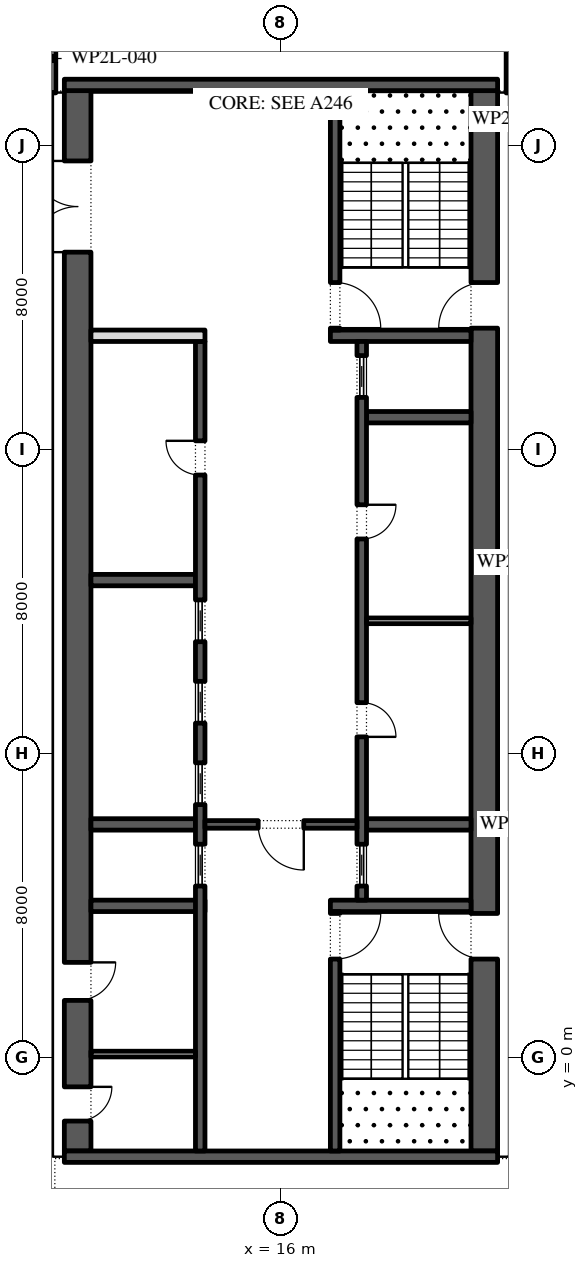
"""IFC4 building model, lengths in metres.
Left out: names, types, materials, properties, quantities, classifications, styles, units other than length and angle.
Written with IfcOpenShell. Run it as: python <this file> out.ifc"""

import sys

from ifc_helpers import new_model, si_unit, direction, frame, frame_2d, origin, place, context, subcontext, project, spatial, rectangle, extrude, element, fill, save


model = new_model("IFC4")
c1 = context("Model", 3, precision=1e-05, world=origin(), true_north=direction((0.0, 1.0)))
c2 = subcontext(c1, "Body", "Model", "MODEL_VIEW")
j1 = project(units=[si_unit("LENGTHUNIT", "METRE"), si_unit("PLANEANGLEUNIT", "RADIAN")], contexts=[c1])
p1 = place(None, origin())
s1 = spatial("IfcSite", under=j1, at=p1, CompositionType="ELEMENT")
p2 = place(p1, origin())
s2 = spatial("IfcBuilding", under=s1, at=p2, CompositionType="ELEMENT")
p3 = place(p2, frame((0.0, 0.0, 196.8)))
s3 = spatial("IfcBuildingStorey", under=s2, at=p3, CompositionType="ELEMENT", Elevation=196.8)
p4 = place(p3, frame((33.157, -5.092, 0.0), z_axis=(0.0, 0.0, 1.0), x_axis=(-0.224950279389, 0.974370243697, 0.0)))
e1 = element("IfcWall", 1, at=p4, inside=s3, PredefinedType="STANDARD", context=c2, shape_type="SweptSolid", body=[
    extrude(rectangle(XDim=49.5, YDim=0.3, at=frame_2d((24.75, 0.0))), origin(), (0.0, 0.0, 1.0), 4.0),
])
p5 = place(p4, frame((2.207, 0.0, 0.0)))
e2 = element("IfcOpeningElement", 2, at=p5, cuts=e1, PredefinedType="OPENING", context=c2, shape_type="SweptSolid", body=[
    extrude(rectangle(XDim=2.4, YDim=3.125, at=frame_2d((1.2, 1.562))), frame((0.0, 0.16, 0.0), z_axis=(0.0, -1.0, 0.0), x_axis=(1.0, 0.0, 0.0)), (0.0, 0.0, 1.0), 0.32),
])
p6 = place(p4, frame((8.121, 0.0, 0.45)))
e3 = element("IfcOpeningElement", 3, at=p6, cuts=e1, PredefinedType="OPENING", context=c2, shape_type="SweptSolid", body=[
    extrude(rectangle(XDim=4.5, YDim=2.875, at=frame_2d((2.25, 1.438))), frame((0.0, 0.16, 0.0), z_axis=(0.0, -1.0, 0.0), x_axis=(1.0, 0.0, 0.0)), (0.0, 0.0, 1.0), 0.32),
])
p7 = place(p4, frame((15.236, 0.0, 0.45)))
e4 = element("IfcOpeningElement", 4, at=p7, cuts=e1, PredefinedType="OPENING", context=c2, shape_type="SweptSolid", body=[
    extrude(rectangle(XDim=4.5, YDim=2.875, at=frame_2d((2.25, 1.438))), frame((0.0, 0.16, 0.0), z_axis=(0.0, -1.0, 0.0), x_axis=(1.0, 0.0, 0.0)), (0.0, 0.0, 1.0), 0.32),
])
p8 = place(p4, frame((22.35, 0.0, 0.45)))
e5 = element("IfcOpeningElement", 5, at=p8, cuts=e1, PredefinedType="OPENING", context=c2, shape_type="SweptSolid", body=[
    extrude(rectangle(XDim=4.5, YDim=3.0, at=frame_2d((2.25, 1.5))), frame((0.0, 0.16, 0.0), z_axis=(0.0, -1.0, 0.0), x_axis=(1.0, 0.0, 0.0)), (0.0, 0.0, 1.0), 0.32),
])
p9 = place(p4, frame((30.514, 0.0, 0.0)))
e6 = element("IfcOpeningElement", 6, at=p9, cuts=e1, PredefinedType="OPENING", context=c2, shape_type="SweptSolid", body=[
    extrude(rectangle(XDim=2.4, YDim=3.45, at=frame_2d((1.2, 1.725))), frame((0.0, 0.16, 0.0), z_axis=(0.0, -1.0, 0.0), x_axis=(1.0, 0.0, 0.0)), (0.0, 0.0, 1.0), 0.32),
])
p10 = place(p4, frame((36.579, 0.0, 0.45)))
e7 = element("IfcOpeningElement", 7, at=p10, cuts=e1, PredefinedType="OPENING", context=c2, shape_type="SweptSolid", body=[
    extrude(rectangle(XDim=4.5, YDim=3.05, at=frame_2d((2.25, 1.525))), frame((0.0, 0.16, 0.0), z_axis=(0.0, -1.0, 0.0), x_axis=(1.0, 0.0, 0.0)), (0.0, 0.0, 1.0), 0.32),
])
p11 = place(p4, frame((43.693, 0.0, 0.45)))
e8 = element("IfcOpeningElement", 8, at=p11, cuts=e1, PredefinedType="OPENING", context=c2, shape_type="SweptSolid", body=[
    extrude(rectangle(XDim=4.5, YDim=3.05, at=frame_2d((2.25, 1.525))), frame((0.0, 0.16, 0.0), z_axis=(0.0, -1.0, 0.0), x_axis=(1.0, 0.0, 0.0)), (0.0, 0.0, 1.0), 0.32),
])
p12 = place(p3, frame((21.35, -2.45, 0.0), z_axis=(0.0, 0.0, 1.0), x_axis=(0.0, 1.0, 0.0)))
e9 = element("IfcWall", 9, at=p12, inside=s3, PredefinedType="SHEAR", context=c2, shape_type="SweptSolid", body=[
    extrude(rectangle(XDim=27.9, YDim=0.7, at=frame_2d((13.95, 0.0))), origin(), (0.0, 0.0, 1.0), 4.0),
])
p13 = place(p12, frame((5.05, 0.0, 0.0)))
e10 = element("IfcOpeningElement", 10, at=p13, cuts=e9, PredefinedType="OPENING", context=c2, shape_type="SweptSolid", body=[
    extrude(rectangle(XDim=1.2, YDim=2.1, at=frame_2d((0.6, 1.05))), frame((0.0, 0.36, 0.0), z_axis=(0.0, -1.0, 0.0), x_axis=(1.0, 0.0, 0.0)), (0.0, 0.0, 1.0), 0.72),
])
p14 = place(p12, frame((21.65, 0.0, 0.0)))
e11 = element("IfcOpeningElement", 11, at=p14, cuts=e9, PredefinedType="OPENING", context=c2, shape_type="SweptSolid", body=[
    extrude(rectangle(XDim=1.2, YDim=2.1, at=frame_2d((0.6, 1.05))), frame((0.0, 0.36, 0.0), z_axis=(0.0, -1.0, 0.0), x_axis=(1.0, 0.0, 0.0)), (0.0, 0.0, 1.0), 0.72),
])
p15 = place(p3, frame((10.65, -2.45, 0.0), z_axis=(0.0, 0.0, 1.0), x_axis=(0.0, 1.0, 0.0)))
e12 = element("IfcWall", 12, at=p15, inside=s3, PredefinedType="SHEAR", context=c2, shape_type="SweptSolid", body=[
    extrude(rectangle(XDim=27.9, YDim=0.7, at=frame_2d((13.95, 0.0))), origin(), (0.0, 0.0, 1.0), 4.0),
])
p16 = place(p15, frame((23.65, 0.0, 0.0)))
e13 = element("IfcOpeningElement", 13, at=p16, cuts=e12, PredefinedType="OPENING", context=c2, shape_type="SweptSolid", body=[
    extrude(rectangle(XDim=2.4, YDim=2.1, at=frame_2d((1.2, 1.05))), frame((0.0, 0.36, 0.0), z_axis=(0.0, -1.0, 0.0), x_axis=(1.0, 0.0, 0.0)), (0.0, 0.0, 1.0), 0.72),
])
p17 = place(p15, frame((0.788, 0.0, 0.0)))
e14 = element("IfcOpeningElement", 14, at=p17, cuts=e12, PredefinedType="OPENING", context=c2, shape_type="SweptSolid", body=[
    extrude(rectangle(XDim=0.9, YDim=2.1, at=frame_2d((0.45, 1.05))), frame((0.0, 0.36, 0.0), z_axis=(0.0, -1.0, 0.0), x_axis=(1.0, 0.0, 0.0)), (0.0, 0.0, 1.0), 0.72),
])
p18 = place(p15, frame((3.962, 0.0, 0.0)))
e15 = element("IfcOpeningElement", 15, at=p18, cuts=e12, PredefinedType="OPENING", context=c2, shape_type="SweptSolid", body=[
    extrude(rectangle(XDim=1.0, YDim=2.1, at=frame_2d((0.5, 1.05))), frame((0.0, 0.36, 0.0), z_axis=(0.0, -1.0, 0.0), x_axis=(1.0, 0.0, 0.0)), (0.0, 0.0, 1.0), 0.72),
])
for number, where, z_axis, x_axis in (
    (16, (10.3, -2.6, 0.0), (0.0, 0.0, 1.0), (1.0, 0.0, 0.0)),
    (17, (10.3, 25.6, 0.0), (0.0, 0.0, 1.0), (1.0, 0.0, 0.0)),
):
    element("IfcWall", number, at=place(p3, frame(where, z_axis=z_axis, x_axis=x_axis)), inside=s3, PredefinedType="SHEAR", context=c2, shape_type="SweptSolid", body=[
        extrude(rectangle(XDim=11.4, YDim=0.3, at=frame_2d((5.7, 0.0))), origin(), (0.0, 0.0, 1.0), 4.0),
    ])
p19 = place(p3, frame((17.3, 4.0, 0.0), z_axis=(0.0, 0.0, 1.0), x_axis=(1.0, 0.0, 0.0)))
e18 = element("IfcWall", 18, at=p19, inside=s3, PredefinedType="SHEAR", context=c2, shape_type="SweptSolid", body=[
    extrude(rectangle(XDim=3.7, YDim=0.3, at=frame_2d((1.85, 0.0))), origin(), (0.0, 0.0, 1.0), 4.0),
])
p20 = place(p3, frame((17.425, -2.45, 0.0), z_axis=(0.0, 0.0, 1.0), x_axis=(0.0, 1.0, 0.0)))
e19 = element("IfcWall", 19, at=p20, inside=s3, PredefinedType="SHEAR", context=c2, shape_type="SweptSolid", body=[
    extrude(rectangle(XDim=6.3, YDim=0.25, at=frame_2d((3.15, 0.0))), origin(), (0.0, 0.0, 1.0), 4.0),
])
p21 = place(p20, frame((5.05, 0.0, 0.0)))
e20 = element("IfcOpeningElement", 20, at=p21, cuts=e19, PredefinedType="OPENING", context=c2, shape_type="SweptSolid", body=[
    extrude(rectangle(XDim=1.2, YDim=2.1, at=frame_2d((0.6, 1.05))), frame((0.0, 0.135, 0.0), z_axis=(0.0, -1.0, 0.0), x_axis=(1.0, 0.0, 0.0)), (0.0, 0.0, 1.0), 0.27),
])
p22 = place(p3, frame((17.3, 19.0, 0.0), z_axis=(0.0, 0.0, 1.0), x_axis=(1.0, 0.0, 0.0)))
e21 = element("IfcWall", 21, at=p22, inside=s3, PredefinedType="SHEAR", context=c2, shape_type="SweptSolid", body=[
    extrude(rectangle(XDim=3.7, YDim=0.3, at=frame_2d((1.85, 0.0))), origin(), (0.0, 0.0, 1.0), 4.0),
])
p23 = place(p3, frame((17.425, 19.15, 0.0), z_axis=(0.0, 0.0, 1.0), x_axis=(0.0, 1.0, 0.0)))
e22 = element("IfcWall", 22, at=p23, inside=s3, PredefinedType="SHEAR", context=c2, shape_type="SweptSolid", body=[
    extrude(rectangle(XDim=6.3, YDim=0.25, at=frame_2d((3.15, 0.0))), origin(), (0.0, 0.0, 1.0), 4.0),
])
p24 = place(p23, frame((0.05, 0.0, 0.0)))
e23 = element("IfcOpeningElement", 23, at=p24, cuts=e22, PredefinedType="OPENING", context=c2, shape_type="SweptSolid", body=[
    extrude(rectangle(XDim=1.2, YDim=2.1, at=frame_2d((0.6, 1.05))), frame((0.0, 0.135, 0.0), z_axis=(0.0, -1.0, 0.0), x_axis=(1.0, 0.0, 0.0)), (0.0, 0.0, 1.0), 0.27),
])
for number, where, z_axis, x_axis in (
    (24, (18.25, 6.143, 0.0), (0.0, 0.0, 1.0), (1.0, 0.0, 0.0)),
    (25, (18.25, 16.857, 0.0), (0.0, 0.0, 1.0), (1.0, 0.0, 0.0)),
):
    element("IfcWall", number, at=place(p3, frame(where, z_axis=z_axis, x_axis=x_axis)), inside=s3, PredefinedType="SHEAR", context=c2, shape_type="SweptSolid", body=[
        extrude(rectangle(XDim=2.75, YDim=0.3, at=frame_2d((1.375, 0.0))), origin(), (0.0, 0.0, 1.0), 4.0),
    ])
p25 = place(p3, frame((18.125, 4.15, 0.0), z_axis=(0.0, 0.0, 1.0), x_axis=(0.0, 1.0, 0.0)))
e26 = element("IfcWall", 26, at=p25, inside=s3, PredefinedType="SHEAR", context=c2, shape_type="SweptSolid", body=[
    extrude(rectangle(XDim=14.7, YDim=0.25, at=frame_2d((7.35, 0.0))), origin(), (0.0, 0.0, 1.0), 4.0),
])
p26 = place(p25, frame((4.296, 0.0, 0.0)))
e27 = element("IfcOpeningElement", 27, at=p26, cuts=e26, PredefinedType="OPENING", context=c2, shape_type="SweptSolid", body=[
    extrude(rectangle(XDim=0.9, YDim=2.1, at=frame_2d((0.45, 1.05))), frame((0.0, 0.135, 0.0), z_axis=(0.0, -1.0, 0.0), x_axis=(1.0, 0.0, 0.0)), (0.0, 0.0, 1.0), 0.27),
])
p27 = place(p25, frame((9.504, 0.0, 0.0)))
e28 = element("IfcOpeningElement", 28, at=p27, cuts=e26, PredefinedType="OPENING", context=c2, shape_type="SweptSolid", body=[
    extrude(rectangle(XDim=0.9, YDim=2.1, at=frame_2d((0.45, 1.05))), frame((0.0, 0.135, 0.0), z_axis=(0.0, -1.0, 0.0), x_axis=(1.0, 0.0, 0.0)), (0.0, 0.0, 1.0), 0.27),
])
p28 = place(p25, frame((0.371, 0.0, 0.0)))
e29 = element("IfcOpeningElement", 29, at=p28, cuts=e26, PredefinedType="OPENING", context=c2, shape_type="SweptSolid", body=[
    extrude(rectangle(XDim=1.1, YDim=2.1, at=frame_2d((0.55, 1.05))), frame((0.0, 0.135, 0.0), z_axis=(0.0, -1.0, 0.0), x_axis=(1.0, 0.0, 0.0)), (0.0, 0.0, 1.0), 0.27),
])
p29 = place(p25, frame((13.229, 0.0, 0.0)))
e30 = element("IfcOpeningElement", 30, at=p29, cuts=e26, PredefinedType="OPENING", context=c2, shape_type="SweptSolid", body=[
    extrude(rectangle(XDim=1.1, YDim=2.1, at=frame_2d((0.55, 1.05))), frame((0.0, 0.135, 0.0), z_axis=(0.0, -1.0, 0.0), x_axis=(1.0, 0.0, 0.0)), (0.0, 0.0, 1.0), 0.27),
])
p30 = place(p3, frame((18.25, 11.5, 0.0), z_axis=(0.0, 0.0, 1.0), x_axis=(1.0, 0.0, 0.0)))
e31 = element("IfcWall", 31, at=p30, inside=s3, PredefinedType="PARTITIONING", context=c2, shape_type="SweptSolid", body=[
    extrude(rectangle(XDim=2.75, YDim=0.15, at=frame_2d((1.375, 0.0))), origin(), (0.0, 0.0, 1.0), 4.0),
])
p31 = place(p3, frame((11.0, 4.0, 0.0), z_axis=(0.0, 0.0, 1.0), x_axis=(1.0, 0.0, 0.0)))
e32 = element("IfcWall", 32, at=p31, inside=s3, PredefinedType="SHEAR", context=c2, shape_type="SweptSolid", body=[
    extrude(rectangle(XDim=3.0, YDim=0.3, at=frame_2d((1.5, 0.0))), origin(), (0.0, 0.0, 1.0), 4.0),
])
for number, where, z_axis, x_axis in (
    (33, (11.0, 6.143, 0.0), (0.0, 0.0, 1.0), (1.0, 0.0, 0.0)),
    (34, (11.0, 12.571, 0.0), (0.0, 0.0, 1.0), (1.0, 0.0, 0.0)),
):
    element("IfcWall", number, at=place(p3, frame(where, z_axis=z_axis, x_axis=x_axis)), inside=s3, PredefinedType="SHEAR", context=c2, shape_type="SweptSolid", body=[
        extrude(rectangle(XDim=2.75, YDim=0.3, at=frame_2d((1.375, 0.0))), origin(), (0.0, 0.0, 1.0), 4.0),
    ])
p32 = place(p3, frame((13.875, -2.45, 0.0), z_axis=(0.0, 0.0, 1.0), x_axis=(0.0, 1.0, 0.0)))
e35 = element("IfcWall", 35, at=p32, inside=s3, PredefinedType="SHEAR", context=c2, shape_type="SweptSolid", body=[
    extrude(rectangle(XDim=21.3, YDim=0.25, at=frame_2d((10.65, 0.0))), origin(), (0.0, 0.0, 1.0), 4.0),
])
p33 = place(p32, frame((17.786, 0.0, 0.0)))
e36 = element("IfcOpeningElement", 36, at=p33, cuts=e35, PredefinedType="OPENING", context=c2, shape_type="SweptSolid", body=[
    extrude(rectangle(XDim=0.9, YDim=2.1, at=frame_2d((0.45, 1.05))), frame((0.0, 0.135, 0.0), z_axis=(0.0, -1.0, 0.0), x_axis=(1.0, 0.0, 0.0)), (0.0, 0.0, 1.0), 0.27),
])
p34 = place(p32, frame((6.971, 0.0, 0.0)))
e37 = element("IfcOpeningElement", 37, at=p34, cuts=e35, PredefinedType="OPENING", context=c2, shape_type="SweptSolid", body=[
    extrude(rectangle(XDim=1.1, YDim=2.1, at=frame_2d((0.55, 1.05))), frame((0.0, 0.135, 0.0), z_axis=(0.0, -1.0, 0.0), x_axis=(1.0, 0.0, 0.0)), (0.0, 0.0, 1.0), 0.27),
])
p35 = place(p32, frame((9.114, 0.0, 0.0)))
e38 = element("IfcOpeningElement", 38, at=p35, cuts=e35, PredefinedType="OPENING", context=c2, shape_type="SweptSolid", body=[
    extrude(rectangle(XDim=1.1, YDim=2.1, at=frame_2d((0.55, 1.05))), frame((0.0, 0.135, 0.0), z_axis=(0.0, -1.0, 0.0), x_axis=(1.0, 0.0, 0.0)), (0.0, 0.0, 1.0), 0.27),
])
p36 = place(p32, frame((11.257, 0.0, 0.0)))
e39 = element("IfcOpeningElement", 39, at=p36, cuts=e35, PredefinedType="OPENING", context=c2, shape_type="SweptSolid", body=[
    extrude(rectangle(XDim=1.1, YDim=2.1, at=frame_2d((0.55, 1.05))), frame((0.0, 0.135, 0.0), z_axis=(0.0, -1.0, 0.0), x_axis=(1.0, 0.0, 0.0)), (0.0, 0.0, 1.0), 0.27),
])
p37 = place(p32, frame((13.4, 0.0, 0.0)))
e40 = element("IfcOpeningElement", 40, at=p37, cuts=e35, PredefinedType="OPENING", context=c2, shape_type="SweptSolid", body=[
    extrude(rectangle(XDim=1.1, YDim=2.1, at=frame_2d((0.55, 1.05))), frame((0.0, 0.135, 0.0), z_axis=(0.0, -1.0, 0.0), x_axis=(1.0, 0.0, 0.0)), (0.0, 0.0, 1.0), 0.27),
])
p38 = place(p3, frame((11.0, 19.0, 0.0), z_axis=(0.0, 0.0, 1.0), x_axis=(1.0, 0.0, 0.0)))
e41 = element("IfcWall", 41, at=p38, inside=s3, PredefinedType="PARTITIONING", context=c2, shape_type="SweptSolid", body=[
    extrude(rectangle(XDim=3.0, YDim=0.3, at=frame_2d((1.5, 0.0))), origin(), (0.0, 0.0, 1.0), 4.0),
])
p39 = place(p3, frame((14.0, 6.143, 0.0), z_axis=(0.0, 0.0, 1.0), x_axis=(1.0, 0.0, 0.0)))
e42 = element("IfcWall", 42, at=p39, inside=s3, PredefinedType="SHEAR", context=c2, shape_type="SweptSolid", body=[
    extrude(rectangle(XDim=4.0, YDim=0.2, at=frame_2d((2.0, 0.0))), origin(), (0.0, 0.0, 1.0), 4.0),
])
p40 = place(p39, frame((1.4, 0.0, 0.0)))
e43 = element("IfcOpeningElement", 43, at=p40, cuts=e42, PredefinedType="OPENING", context=c2, shape_type="SweptSolid", body=[
    extrude(rectangle(XDim=1.2, YDim=2.1, at=frame_2d((0.6, 1.05))), frame((0.0, 0.11, 0.0), z_axis=(0.0, -1.0, 0.0), x_axis=(1.0, 0.0, 0.0)), (0.0, 0.0, 1.0), 0.22),
])
p41 = place(p3, frame((11.0, 0.1, 0.0), z_axis=(0.0, 0.0, 1.0), x_axis=(1.0, 0.0, 0.0)))
e44 = element("IfcWall", 44, at=p41, inside=s3, PredefinedType="PARTITIONING", context=c2, shape_type="SweptSolid", body=[
    extrude(rectangle(XDim=2.75, YDim=0.15, at=frame_2d((1.375, 0.0))), origin(), (0.0, 0.0, 1.0), 4.0),
])
p42 = place(p3, frame((10.0, 27.2, 0.0), z_axis=(0.0, 0.0, 1.0), x_axis=(0.0, -1.0, 0.0)))
e45 = element("IfcWall", 45, at=p42, inside=s3, PredefinedType="PARTITIONING", context=c2, shape_type="SweptSolid", body=[
    extrude(rectangle(XDim=1.81, YDim=0.15, at=frame_2d((0.905, 0.0))), origin(), (0.0, 0.0, 1.0), 3.02),
])
p43 = place(p3, frame((22.0, 25.39, 0.0), z_axis=(0.0, 0.0, 1.0), x_axis=(0.0, 1.0, 0.0)))
e46 = element("IfcWall", 46, at=p43, inside=s3, PredefinedType="PARTITIONING", context=c2, shape_type="SweptSolid", body=[
    extrude(rectangle(XDim=1.81, YDim=0.15, at=frame_2d((0.905, 0.0))), origin(), (0.0, 0.0, 1.0), 4.0),
])
p44 = place(p26, frame((0.9, -0.2, 0.0), z_axis=(0.0, 0.0, 1.0), x_axis=(-1.0, 0.0, 0.0)))
e47 = element("IfcDoor", 47, at=p44, inside=s3, OperationType="SINGLE_SWING_LEFT", PredefinedType="DOOR", context=c2, shape_type="SweptSolid", body=[
    extrude(rectangle(XDim=0.9, YDim=2.1, at=frame_2d((0.45, 1.05))), frame((0.0, -0.075, 0.0), z_axis=(0.0, -1.0, 0.0), x_axis=(1.0, 0.0, 0.0)), (0.0, 0.0, 1.0), 0.05),
])
fill(e27, e47)
p45 = place(p27, frame((0.9, -0.2, 0.0), z_axis=(0.0, 0.0, 1.0), x_axis=(-1.0, 0.0, 0.0)))
e48 = element("IfcDoor", 48, at=p45, inside=s3, OperationType="SINGLE_SWING_RIGHT", PredefinedType="DOOR", context=c2, shape_type="SweptSolid", body=[
    extrude(rectangle(XDim=0.9, YDim=2.1, at=frame_2d((0.45, 1.05))), frame((0.0, -0.075, 0.0), z_axis=(0.0, -1.0, 0.0), x_axis=(1.0, 0.0, 0.0)), (0.0, 0.0, 1.0), 0.05),
])
fill(e28, e48)
p46 = place(p28, origin())
e49 = element("IfcDoor", 49, at=p46, inside=s3, OperationType="SLIDING_TO_LEFT", PredefinedType="DOOR", context=c2, shape_type="SweptSolid", body=[
    extrude(rectangle(XDim=1.1, YDim=2.1, at=frame_2d((0.55, 1.05))), frame((0.0, 0.025, 0.0), z_axis=(0.0, -1.0, 0.0), x_axis=(1.0, 0.0, 0.0)), (0.0, 0.0, 1.0), 0.05),
])
fill(e29, e49)
p47 = place(p29, origin())
e50 = element("IfcDoor", 50, at=p47, inside=s3, OperationType="SLIDING_TO_LEFT", PredefinedType="DOOR", context=c2, shape_type="SweptSolid", body=[
    extrude(rectangle(XDim=1.1, YDim=2.1, at=frame_2d((0.55, 1.05))), frame((0.0, 0.025, 0.0), z_axis=(0.0, -1.0, 0.0), x_axis=(1.0, 0.0, 0.0)), (0.0, 0.0, 1.0), 0.05),
])
fill(e30, e50)
p48 = place(p33, origin())
e51 = element("IfcDoor", 51, at=p48, inside=s3, OperationType="SINGLE_SWING_LEFT", PredefinedType="DOOR", context=c2, shape_type="SweptSolid", body=[
    extrude(rectangle(XDim=0.9, YDim=2.1, at=frame_2d((0.45, 1.05))), frame((0.0, 0.125, 0.0), z_axis=(0.0, -1.0, 0.0), x_axis=(1.0, 0.0, 0.0)), (0.0, 0.0, 1.0), 0.05),
])
fill(e36, e51)
p49 = place(p34, origin())
e52 = element("IfcDoor", 52, at=p49, inside=s3, OperationType="SLIDING_TO_LEFT", PredefinedType="DOOR", context=c2, shape_type="SweptSolid", body=[
    extrude(rectangle(XDim=1.1, YDim=2.1, at=frame_2d((0.55, 1.05))), frame((0.0, 0.025, 0.0), z_axis=(0.0, -1.0, 0.0), x_axis=(1.0, 0.0, 0.0)), (0.0, 0.0, 1.0), 0.05),
])
fill(e37, e52)
p50 = place(p35, origin())
e53 = element("IfcDoor", 53, at=p50, inside=s3, OperationType="SLIDING_TO_LEFT", PredefinedType="DOOR", context=c2, shape_type="SweptSolid", body=[
    extrude(rectangle(XDim=1.1, YDim=2.1, at=frame_2d((0.55, 1.05))), frame((0.0, 0.025, 0.0), z_axis=(0.0, -1.0, 0.0), x_axis=(1.0, 0.0, 0.0)), (0.0, 0.0, 1.0), 0.05),
])
fill(e38, e53)
p51 = place(p36, origin())
e54 = element("IfcDoor", 54, at=p51, inside=s3, OperationType="SLIDING_TO_LEFT", PredefinedType="DOOR", context=c2, shape_type="SweptSolid", body=[
    extrude(rectangle(XDim=1.1, YDim=2.1, at=frame_2d((0.55, 1.05))), frame((0.0, 0.025, 0.0), z_axis=(0.0, -1.0, 0.0), x_axis=(1.0, 0.0, 0.0)), (0.0, 0.0, 1.0), 0.05),
])
fill(e39, e54)
p52 = place(p37, origin())
e55 = element("IfcDoor", 55, at=p52, inside=s3, OperationType="SLIDING_TO_LEFT", PredefinedType="DOOR", context=c2, shape_type="SweptSolid", body=[
    extrude(rectangle(XDim=1.1, YDim=2.1, at=frame_2d((0.55, 1.05))), frame((0.0, 0.025, 0.0), z_axis=(0.0, -1.0, 0.0), x_axis=(1.0, 0.0, 0.0)), (0.0, 0.0, 1.0), 0.05),
])
fill(e40, e55)
p53 = place(p40, frame((1.2, 0.0, 0.0), z_axis=(0.0, 0.0, 1.0), x_axis=(-1.0, 0.0, 0.0)))
e56 = element("IfcDoor", 56, at=p53, inside=s3, OperationType="SINGLE_SWING_RIGHT", PredefinedType="DOOR", context=c2, shape_type="SweptSolid", body=[
    extrude(rectangle(XDim=1.2, YDim=2.1, at=frame_2d((0.6, 1.05))), frame((0.0, 0.025, 0.0), z_axis=(0.0, -1.0, 0.0), x_axis=(1.0, 0.0, 0.0)), (0.0, 0.0, 1.0), 0.05),
])
fill(e43, e56)
p54 = place(p16, origin())
e57 = element("IfcDoor", 57, at=p54, inside=s3, OperationType="DOUBLE_DOOR_SINGLE_SWING", PredefinedType="DOOR", context=c2, shape_type="SweptSolid", body=[
    extrude(rectangle(XDim=2.4, YDim=2.1, at=frame_2d((1.2, 1.05))), frame((0.0, 0.025, 0.0), z_axis=(0.0, -1.0, 0.0), x_axis=(1.0, 0.0, 0.0)), (0.0, 0.0, 1.0), 0.05),
])
fill(e13, e57)
p55 = place(p21, frame((1.2, 0.0, 0.0), z_axis=(0.0, 0.0, 1.0), x_axis=(-1.0, 0.0, 0.0)))
e58 = element("IfcDoor", 58, at=p55, inside=s3, OperationType="SINGLE_SWING_RIGHT", PredefinedType="DOOR", context=c2, shape_type="SweptSolid", body=[
    extrude(rectangle(XDim=1.2, YDim=2.1, at=frame_2d((0.6, 1.05))), frame((0.0, 0.025, 0.0), z_axis=(0.0, -1.0, 0.0), x_axis=(1.0, 0.0, 0.0)), (0.0, 0.0, 1.0), 0.05),
])
fill(e20, e58)
p56 = place(p13, origin())
e59 = element("IfcDoor", 59, at=p56, inside=s3, OperationType="SINGLE_SWING_LEFT", PredefinedType="DOOR", context=c2, shape_type="SweptSolid", body=[
    extrude(rectangle(XDim=1.2, YDim=2.1, at=frame_2d((0.6, 1.05))), frame((0.0, 0.025, 0.0), z_axis=(0.0, -1.0, 0.0), x_axis=(1.0, 0.0, 0.0)), (0.0, 0.0, 1.0), 0.05),
])
fill(e10, e59)
p57 = place(p24, frame((1.2, 0.0, 0.0), z_axis=(0.0, 0.0, 1.0), x_axis=(-1.0, 0.0, 0.0)))
e60 = element("IfcDoor", 60, at=p57, inside=s3, OperationType="SINGLE_SWING_LEFT", PredefinedType="DOOR", context=c2, shape_type="SweptSolid", body=[
    extrude(rectangle(XDim=1.2, YDim=2.1, at=frame_2d((0.6, 1.05))), frame((0.0, 0.025, 0.0), z_axis=(0.0, -1.0, 0.0), x_axis=(1.0, 0.0, 0.0)), (0.0, 0.0, 1.0), 0.05),
])
fill(e23, e60)
p58 = place(p14, origin())
e61 = element("IfcDoor", 61, at=p58, inside=s3, OperationType="SINGLE_SWING_RIGHT", PredefinedType="DOOR", context=c2, shape_type="SweptSolid", body=[
    extrude(rectangle(XDim=1.2, YDim=2.1, at=frame_2d((0.6, 1.05))), frame((0.0, 0.025, 0.0), z_axis=(0.0, -1.0, 0.0), x_axis=(1.0, 0.0, 0.0)), (0.0, 0.0, 1.0), 0.05),
])
fill(e11, e61)
p59 = place(p17, frame((0.9, -0.65, 0.0), z_axis=(0.0, 0.0, 1.0), x_axis=(-1.0, 0.0, 0.0)))
e62 = element("IfcDoor", 62, at=p59, inside=s3, OperationType="SINGLE_SWING_RIGHT", PredefinedType="DOOR", context=c2, shape_type="SweptSolid", body=[
    extrude(rectangle(XDim=0.9, YDim=2.1, at=frame_2d((0.45, 1.05))), frame((0.0, -0.3, 0.0), z_axis=(0.0, -1.0, 0.0), x_axis=(1.0, 0.0, 0.0)), (0.0, 0.0, 1.0), 0.05),
])
fill(e14, e62)
p60 = place(p18, frame((1.0, -0.65, 0.0), z_axis=(0.0, 0.0, 1.0), x_axis=(-1.0, 0.0, 0.0)))
e63 = element("IfcDoor", 63, at=p60, inside=s3, OperationType="SINGLE_SWING_RIGHT", PredefinedType="DOOR", context=c2, shape_type="SweptSolid", body=[
    extrude(rectangle(XDim=1.0, YDim=2.1, at=frame_2d((0.5, 1.05))), frame((0.0, -0.3, 0.0), z_axis=(0.0, -1.0, 0.0), x_axis=(1.0, 0.0, 0.0)), (0.0, 0.0, 1.0), 0.05),
])
fill(e15, e63)
save(model, sys.argv[1])
